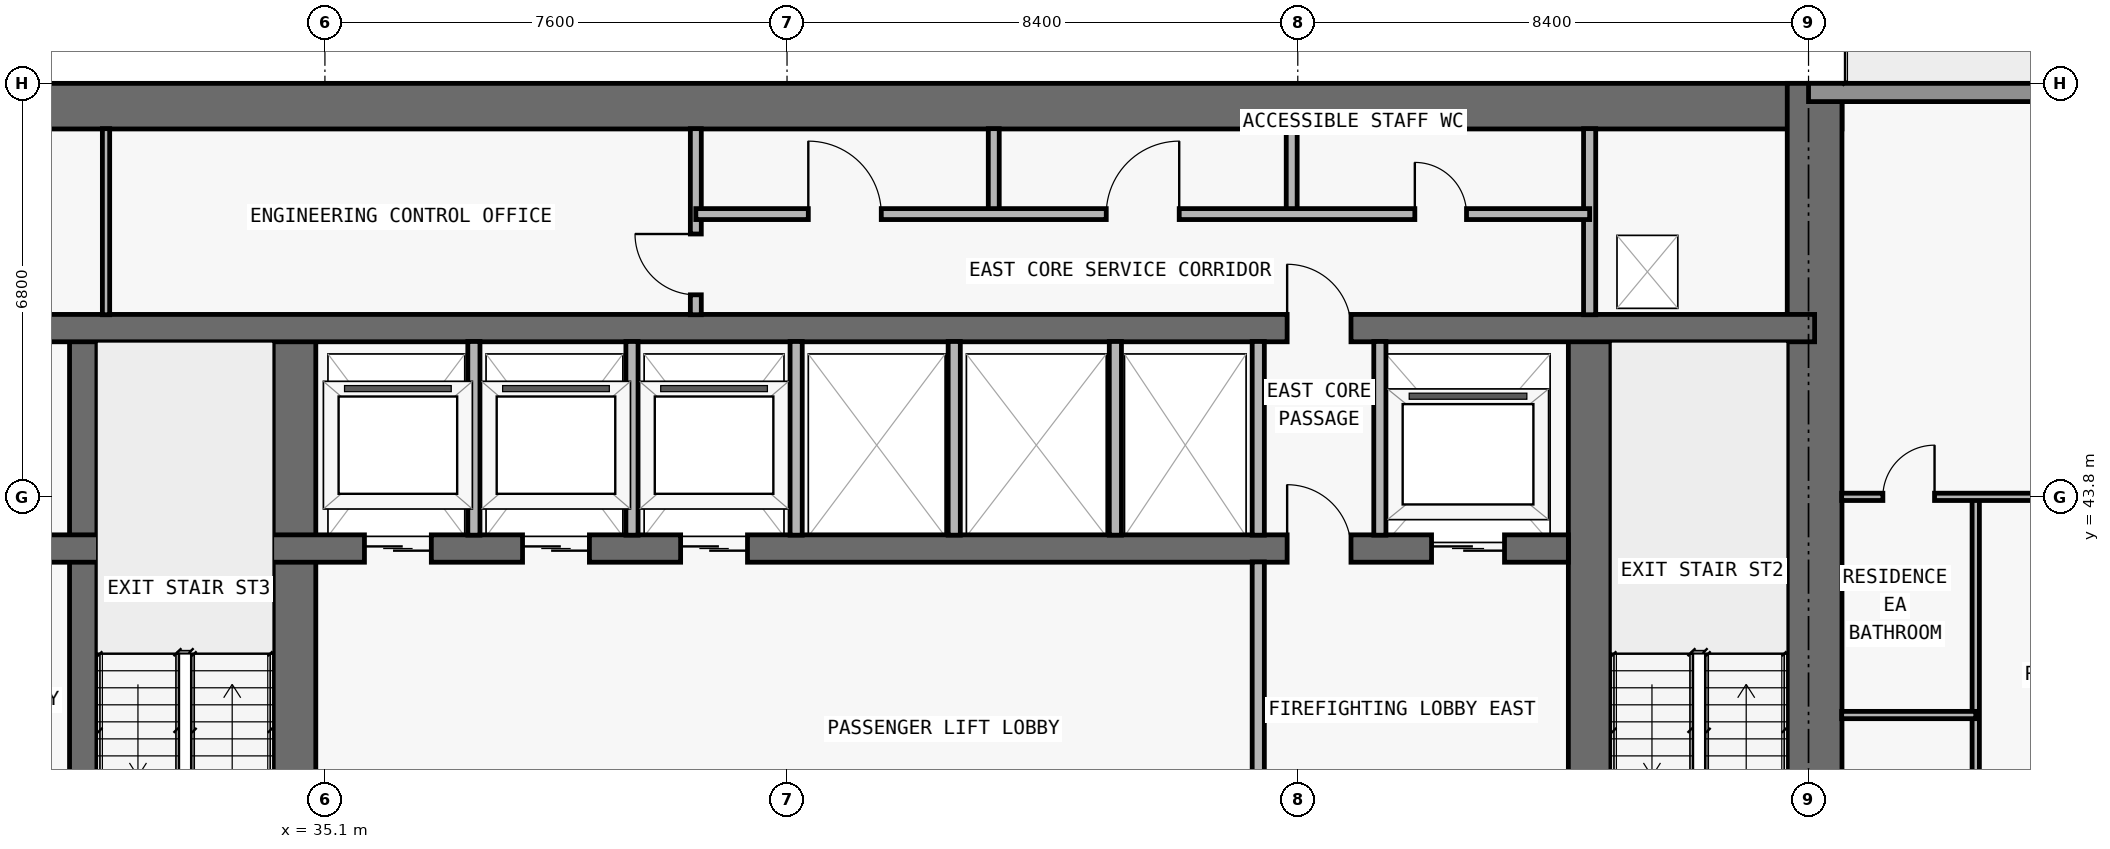
"""IFC4 building model, lengths in metres.
Left out: names, types, materials, properties, quantities, classifications, styles, units other than length and angle.
Written with IfcOpenShell. Run it as: python <this file> out.ifc"""

import sys

from ifc_helpers import new_model, si_unit, direction, frame, frame_2d, origin, place, context, subcontext, project, spatial, rectangle, extrude, element, fill, save


model = new_model("IFC4")
c1 = context("Model", 3, precision=1e-05, world=origin(), true_north=direction((0.0, 1.0)))
c2 = subcontext(c1, "Body", "Model", "MODEL_VIEW")
j1 = project(units=[si_unit("LENGTHUNIT", "METRE"), si_unit("PLANEANGLEUNIT", "RADIAN")], contexts=[c1])
p1 = place(None, origin())
s1 = spatial("IfcSite", under=j1, at=p1, CompositionType="ELEMENT")
p2 = place(p1, origin())
s2 = spatial("IfcBuilding", under=s1, at=p2, CompositionType="ELEMENT")
p3 = place(p2, frame((0.0, 0.0, 39.9)))
s3 = spatial("IfcBuildingStorey", under=s2, at=p3, CompositionType="ELEMENT", Elevation=39.9)
p4 = place(p3, frame((17.75, 50.225, 0.0), z_axis=(0.0, 0.0, 1.0), x_axis=(1.0, 0.0, 0.0)))
e1 = element("IfcWall", 1, at=p4, inside=s3, PredefinedType="SHEAR", context=c2, shape_type="SweptSolid", body=[
    extrude(rectangle(XDim=42.3, YDim=0.75, at=frame_2d((21.15, 0.0))), origin(), (0.0, 0.0, 1.0), 3.05),
])
p5 = place(p3, frame((59.6, 36.45, 0.0), z_axis=(0.0, 0.0, 1.0), x_axis=(0.0, 1.0, 0.0)))
e2 = element("IfcWall", 2, at=p5, inside=s3, PredefinedType="SHEAR", context=c2, shape_type="SweptSolid", body=[
    extrude(rectangle(XDim=14.15, YDim=0.9, at=frame_2d((7.075, 0.0))), origin(), (0.0, 0.0, 1.0), 3.05),
])
p6 = place(p3, frame((55.9, 36.9, 0.0), z_axis=(0.0, 0.0, 1.0), x_axis=(0.0, 1.0, 0.0)))
e3 = element("IfcWall", 3, at=p6, inside=s3, PredefinedType="SHEAR", context=c2, shape_type="SweptSolid", body=[
    extrude(rectangle(XDim=9.675, YDim=0.7, at=frame_2d((4.837, 0.0))), origin(), (0.0, 0.0, 1.0), 3.05),
])
p7 = place(p6, frame((0.65, 0.0, 0.0)))
e4 = element("IfcOpeningElement", 4, at=p7, cuts=e3, PredefinedType="OPENING", context=c2, shape_type="SweptSolid", body=[
    extrude(rectangle(XDim=1.1, YDim=2.15, at=frame_2d((0.55, 1.075))), frame((0.0, 0.36, 0.0), z_axis=(0.0, -1.0, 0.0), x_axis=(1.0, 0.0, 0.0)), (0.0, 0.0, 1.0), 0.72),
])
p8 = place(p3, frame((31.125, 36.9, 0.0), z_axis=(0.0, 0.0, 1.0), x_axis=(0.0, 1.0, 0.0)))
e5 = element("IfcWall", 5, at=p8, inside=s3, PredefinedType="SHEAR", context=c2, shape_type="SweptSolid", body=[
    extrude(rectangle(XDim=9.675, YDim=0.45, at=frame_2d((4.837, 0.0))), origin(), (0.0, 0.0, 1.0), 3.05),
])
p9 = place(p3, frame((34.6, 36.9, 0.0), z_axis=(0.0, 0.0, 1.0), x_axis=(0.0, 1.0, 0.0)))
e6 = element("IfcWall", 6, at=p9, inside=s3, PredefinedType="SHEAR", context=c2, shape_type="SweptSolid", body=[
    extrude(rectangle(XDim=9.675, YDim=0.7, at=frame_2d((4.837, 0.0))), origin(), (0.0, 0.0, 1.0), 3.05),
])
p10 = place(p3, frame((22.25, 42.95, 0.0), z_axis=(0.0, 0.0, 1.0), x_axis=(1.0, 0.0, 0.0)))
e7 = element("IfcWall", 7, at=p10, inside=s3, PredefinedType="SHEAR", context=c2, shape_type="SweptSolid", body=[
    extrude(rectangle(XDim=33.3, YDim=0.45, at=frame_2d((16.65, 0.0))), origin(), (0.0, 0.0, 1.0), 3.05),
])
p11 = place(p10, frame((1.05, 0.0, 0.0)))
e8 = element("IfcOpeningElement", 8, at=p11, cuts=e7, PredefinedType="OPENING", context=c2, shape_type="SweptSolid", body=[
    extrude(rectangle(XDim=1.2, YDim=2.2, at=frame_2d((0.6, 1.1))), frame((0.0, 0.235, 0.0), z_axis=(0.0, -1.0, 0.0), x_axis=(1.0, 0.0, 0.0)), (0.0, 0.0, 1.0), 0.47),
])
p12 = place(p10, frame((31.05, 0.0, 0.0)))
e9 = element("IfcOpeningElement", 9, at=p12, cuts=e7, PredefinedType="OPENING", context=c2, shape_type="SweptSolid", body=[
    extrude(rectangle(XDim=1.2, YDim=2.2, at=frame_2d((0.6, 1.1))), frame((0.0, 0.235, 0.0), z_axis=(0.0, -1.0, 0.0), x_axis=(1.0, 0.0, 0.0)), (0.0, 0.0, 1.0), 0.47),
])
p13 = place(p10, frame((13.5, 0.0, 0.0)))
e10 = element("IfcOpeningElement", 10, at=p13, cuts=e7, PredefinedType="OPENING", context=c2, shape_type="SweptSolid", body=[
    extrude(rectangle(XDim=1.1, YDim=2.2, at=frame_2d((0.55, 1.1))), frame((0.0, 0.235, 0.0), z_axis=(0.0, -1.0, 0.0), x_axis=(1.0, 0.0, 0.0)), (0.0, 0.0, 1.0), 0.47),
])
p14 = place(p10, frame((16.1, 0.0, 0.0)))
e11 = element("IfcOpeningElement", 11, at=p14, cuts=e7, PredefinedType="OPENING", context=c2, shape_type="SweptSolid", body=[
    extrude(rectangle(XDim=1.1, YDim=2.2, at=frame_2d((0.55, 1.1))), frame((0.0, 0.235, 0.0), z_axis=(0.0, -1.0, 0.0), x_axis=(1.0, 0.0, 0.0)), (0.0, 0.0, 1.0), 0.47),
])
p15 = place(p10, frame((18.7, 0.0, 0.0)))
e12 = element("IfcOpeningElement", 12, at=p15, cuts=e7, PredefinedType="OPENING", context=c2, shape_type="SweptSolid", body=[
    extrude(rectangle(XDim=1.1, YDim=2.2, at=frame_2d((0.55, 1.1))), frame((0.0, 0.235, 0.0), z_axis=(0.0, -1.0, 0.0), x_axis=(1.0, 0.0, 0.0)), (0.0, 0.0, 1.0), 0.47),
])
p16 = place(p10, frame((3.625, 0.0, 0.0)))
e13 = element("IfcOpeningElement", 13, at=p16, cuts=e7, PredefinedType="OPENING", context=c2, shape_type="SweptSolid", body=[
    extrude(rectangle(XDim=1.05, YDim=2.15, at=frame_2d((0.525, 1.075))), frame((0.0, 0.235, 0.0), z_axis=(0.0, -1.0, 0.0), x_axis=(1.0, 0.0, 0.0)), (0.0, 0.0, 1.0), 0.47),
])
p17 = place(p10, frame((28.675, 0.0, 0.0)))
e14 = element("IfcOpeningElement", 14, at=p17, cuts=e7, PredefinedType="OPENING", context=c2, shape_type="SweptSolid", body=[
    extrude(rectangle(XDim=1.05, YDim=2.15, at=frame_2d((0.525, 1.075))), frame((0.0, 0.235, 0.0), z_axis=(0.0, -1.0, 0.0), x_axis=(1.0, 0.0, 0.0)), (0.0, 0.0, 1.0), 0.47),
])
p18 = place(p3, frame((18.2, 46.575, 0.0), z_axis=(0.0, 0.0, 1.0), x_axis=(1.0, 0.0, 0.0)))
e15 = element("IfcWall", 15, at=p18, inside=s3, PredefinedType="SHEAR", context=c2, shape_type="SweptSolid", body=[
    extrude(rectangle(XDim=41.4, YDim=0.45, at=frame_2d((20.7, 0.0))), origin(), (0.0, 0.0, 1.0), 3.05),
])
p19 = place(p18, frame((7.7, 0.0, 0.0)))
e16 = element("IfcOpeningElement", 16, at=p19, cuts=e15, PredefinedType="OPENING", context=c2, shape_type="SweptSolid", body=[
    extrude(rectangle(XDim=1.0, YDim=2.2, at=frame_2d((0.5, 1.1))), frame((0.0, 0.235, 0.0), z_axis=(0.0, -1.0, 0.0), x_axis=(1.0, 0.0, 0.0)), (0.0, 0.0, 1.0), 0.47),
])
p20 = place(p18, frame((32.725, 0.0, 0.0)))
e17 = element("IfcOpeningElement", 17, at=p20, cuts=e15, PredefinedType="OPENING", context=c2, shape_type="SweptSolid", body=[
    extrude(rectangle(XDim=1.05, YDim=2.15, at=frame_2d((0.525, 1.075))), frame((0.0, 0.235, 0.0), z_axis=(0.0, -1.0, 0.0), x_axis=(1.0, 0.0, 0.0)), (0.0, 0.0, 1.0), 0.47),
])
p21 = place(p3, frame((59.5, 50.45, 0.0), z_axis=(0.0, 0.0, 1.0), x_axis=(1.0, 0.0, 0.0)))
e18 = element("IfcWall", 18, at=p21, inside=s3, PredefinedType="STANDARD", context=c2, shape_type="SweptSolid", body=[
    extrude(rectangle(XDim=13.2, YDim=0.3, at=frame_2d((6.6, 0.0))), origin(), (0.0, 0.0, 1.0), 3.05),
])
p22 = place(p21, frame((5.6, 0.0, 0.0)))
e19 = element("IfcOpeningElement", 19, at=p22, cuts=e18, PredefinedType="OPENING", context=c2, shape_type="SweptSolid", body=[
    extrude(rectangle(XDim=2.0, YDim=2.3, at=frame_2d((1.0, 1.15))), frame((0.0, 0.16, 0.0), z_axis=(0.0, -1.0, 0.0), x_axis=(1.0, 0.0, 0.0)), (0.0, 0.0, 1.0), 0.32),
])
p23 = place(p3, frame((31.5, 46.795, 0.0), z_axis=(0.0, 0.0, 1.0), x_axis=(0.0, 1.0, 0.0)))
e20 = element("IfcWall", 20, at=p23, inside=s3, PredefinedType="PARTITIONING", context=c2, shape_type="SweptSolid", body=[
    extrude(rectangle(XDim=3.06, YDim=0.12, at=frame_2d((1.53, 0.0))), origin(), (0.0, 0.0, 1.0), 3.05),
])
for number, where, z_axis, x_axis in (
    (21, (37.55, 43.17, 0.0), (0.0, 0.0, 1.0), (0.0, 1.0, 0.0)),
    (22, (40.15, 43.17, 0.0), (0.0, 0.0, 1.0), (0.0, 1.0, 0.0)),
):
    element("IfcWall", number, at=place(p3, frame(where, z_axis=z_axis, x_axis=x_axis)), inside=s3, PredefinedType="PARTITIONING", context=c2, shape_type="SweptSolid", body=[
        extrude(rectangle(XDim=3.185, YDim=0.2, at=frame_2d((1.593, 0.0))), origin(), (0.0, 0.0, 1.0), 3.05),
    ])
p24 = place(p3, frame((41.2, 46.795, 0.0), z_axis=(0.0, 0.0, 1.0), x_axis=(0.0, 1.0, 0.0)))
e23 = element("IfcWall", 23, at=p24, inside=s3, PredefinedType="PARTITIONING", context=c2, shape_type="SweptSolid", body=[
    extrude(rectangle(XDim=3.06, YDim=0.18, at=frame_2d((1.53, 0.0))), origin(), (0.0, 0.0, 1.0), 3.05),
])
p25 = place(p24, frame((0.327, 0.0, 0.0)))
e24 = element("IfcOpeningElement", 24, at=p25, cuts=e23, PredefinedType="OPENING", context=c2, shape_type="SweptSolid", body=[
    extrude(rectangle(XDim=1.0, YDim=2.2, at=frame_2d((0.5, 1.1))), frame((0.0, 0.1, 0.0), z_axis=(0.0, -1.0, 0.0), x_axis=(1.0, 0.0, 0.0)), (0.0, 0.0, 1.0), 0.2),
])
for number, where, z_axis, x_axis in (
    (25, (42.85, 43.17, 0.0), (0.0, 0.0, 1.0), (0.0, 1.0, 0.0)),
    (26, (45.45, 43.17, 0.0), (0.0, 0.0, 1.0), (0.0, 1.0, 0.0)),
):
    element("IfcWall", number, at=place(p3, frame(where, z_axis=z_axis, x_axis=x_axis)), inside=s3, PredefinedType="PARTITIONING", context=c2, shape_type="SweptSolid", body=[
        extrude(rectangle(XDim=3.185, YDim=0.2, at=frame_2d((1.593, 0.0))), origin(), (0.0, 0.0, 1.0), 3.05),
    ])
p26 = place(p3, frame((46.1, 48.45, 0.0), z_axis=(0.0, 0.0, 1.0), x_axis=(0.0, 1.0, 0.0)))
e27 = element("IfcWall", 27, at=p26, inside=s3, PredefinedType="PARTITIONING", context=c2, shape_type="SweptSolid", body=[
    extrude(rectangle(XDim=1.405, YDim=0.18, at=frame_2d((0.703, 0.0))), origin(), (0.0, 0.0, 1.0), 3.05),
])
p27 = place(p3, frame((48.1, 43.17, 0.0), z_axis=(0.0, 0.0, 1.0), x_axis=(0.0, 1.0, 0.0)))
e28 = element("IfcWall", 28, at=p27, inside=s3, PredefinedType="PARTITIONING", context=c2, shape_type="SweptSolid", body=[
    extrude(rectangle(XDim=3.185, YDim=0.2, at=frame_2d((1.593, 0.0))), origin(), (0.0, 0.0, 1.0), 3.05),
])
p28 = place(p3, frame((50.45, 37.345, 0.0), z_axis=(0.0, 0.0, 1.0), x_axis=(0.0, 1.0, 0.0)))
e29 = element("IfcWall", 29, at=p28, inside=s3, PredefinedType="PARTITIONING", context=c2, shape_type="SweptSolid", body=[
    extrude(rectangle(XDim=5.385, YDim=0.2, at=frame_2d((2.692, 0.0))), origin(), (0.0, 0.0, 1.0), 3.05),
])
p29 = place(p3, frame((50.45, 43.17, 0.0), z_axis=(0.0, 0.0, 1.0), x_axis=(0.0, 1.0, 0.0)))
e30 = element("IfcWall", 30, at=p29, inside=s3, PredefinedType="PARTITIONING", context=c2, shape_type="SweptSolid", body=[
    extrude(rectangle(XDim=3.185, YDim=0.2, at=frame_2d((1.593, 0.0))), origin(), (0.0, 0.0, 1.0), 3.05),
])
p30 = place(p3, frame((51.0, 48.45, 0.0), z_axis=(0.0, 0.0, 1.0), x_axis=(0.0, 1.0, 0.0)))
e31 = element("IfcWall", 31, at=p30, inside=s3, PredefinedType="PARTITIONING", context=c2, shape_type="SweptSolid", body=[
    extrude(rectangle(XDim=1.405, YDim=0.18, at=frame_2d((0.703, 0.0))), origin(), (0.0, 0.0, 1.0), 3.05),
])
p31 = place(p3, frame((52.45, 43.17, 0.0), z_axis=(0.0, 0.0, 1.0), x_axis=(0.0, 1.0, 0.0)))
e32 = element("IfcWall", 32, at=p31, inside=s3, PredefinedType="PARTITIONING", context=c2, shape_type="SweptSolid", body=[
    extrude(rectangle(XDim=3.185, YDim=0.2, at=frame_2d((1.593, 0.0))), origin(), (0.0, 0.0, 1.0), 3.05),
])
p32 = place(p3, frame((55.9, 46.795, 0.0), z_axis=(0.0, 0.0, 1.0), x_axis=(0.0, 1.0, 0.0)))
e33 = element("IfcWall", 33, at=p32, inside=s3, PredefinedType="PARTITIONING", context=c2, shape_type="SweptSolid", body=[
    extrude(rectangle(XDim=3.06, YDim=0.2, at=frame_2d((1.53, 0.0))), origin(), (0.0, 0.0, 1.0), 3.05),
])
p33 = place(p3, frame((62.25, 36.9, 0.0), z_axis=(0.0, 0.0, 1.0), x_axis=(0.0, 1.0, 0.0)))
e34 = element("IfcWall", 34, at=p33, inside=s3, PredefinedType="PARTITIONING", context=c2, shape_type="SweptSolid", body=[
    extrude(rectangle(XDim=6.9, YDim=0.12, at=frame_2d((3.45, 0.0))), origin(), (0.0, 0.0, 1.0), 3.05),
])
p34 = place(p33, frame((1.231, 0.0, 0.0)))
e35 = element("IfcOpeningElement", 35, at=p34, cuts=e34, PredefinedType="OPENING", context=c2, shape_type="SweptSolid", body=[
    extrude(rectangle(XDim=0.85, YDim=2.1, at=frame_2d((0.425, 1.05))), frame((0.0, 0.07, 0.0), z_axis=(0.0, -1.0, 0.0), x_axis=(1.0, 0.0, 0.0)), (0.0, 0.0, 1.0), 0.14),
])
p35 = place(p3, frame((60.045, 40.212, 0.0), z_axis=(0.0, 0.0, 1.0), x_axis=(1.0, 0.0, 0.0)))
e36 = element("IfcWall", 36, at=p35, inside=s3, PredefinedType="PARTITIONING", context=c2, shape_type="SweptSolid", body=[
    extrude(rectangle(XDim=2.205, YDim=0.12, at=frame_2d((1.103, 0.0))), origin(), (0.0, 0.0, 1.0), 3.05),
])
p36 = place(p3, frame((60.045, 43.8, 0.0), z_axis=(0.0, 0.0, 1.0), x_axis=(1.0, 0.0, 0.0)))
e37 = element("IfcWall", 37, at=p36, inside=s3, PredefinedType="PARTITIONING", context=c2, shape_type="SweptSolid", body=[
    extrude(rectangle(XDim=15.96, YDim=0.12, at=frame_2d((7.98, 0.0))), origin(), (0.0, 0.0, 1.0), 2.339),
])
p37 = place(p36, frame((9.805, 0.0, 0.0)))
e38 = element("IfcOpeningElement", 38, at=p37, cuts=e37, PredefinedType="OPENING", context=c2, shape_type="SweptSolid", body=[
    extrude(rectangle(XDim=0.9, YDim=2.15, at=frame_2d((0.45, 1.075))), frame((0.0, 0.07, 0.0), z_axis=(0.0, -1.0, 0.0), x_axis=(1.0, 0.0, 0.0)), (0.0, 0.0, 1.0), 0.14),
])
p38 = place(p36, frame((4.58, 0.0, 0.0)))
e39 = element("IfcOpeningElement", 39, at=p38, cuts=e37, PredefinedType="OPENING", context=c2, shape_type="SweptSolid", body=[
    extrude(rectangle(XDim=0.9, YDim=2.15, at=frame_2d((0.45, 1.075))), frame((0.0, 0.07, 0.0), z_axis=(0.0, -1.0, 0.0), x_axis=(1.0, 0.0, 0.0)), (0.0, 0.0, 1.0), 0.14),
])
p39 = place(p36, frame((0.677, 0.0, 0.0)))
e40 = element("IfcOpeningElement", 40, at=p39, cuts=e37, PredefinedType="OPENING", context=c2, shape_type="SweptSolid", body=[
    extrude(rectangle(XDim=0.85, YDim=2.1, at=frame_2d((0.425, 1.05))), frame((0.0, 0.07, 0.0), z_axis=(0.0, -1.0, 0.0), x_axis=(1.0, 0.0, 0.0)), (0.0, 0.0, 1.0), 0.14),
])
p40 = place(p3, frame((41.2, 48.45, 0.0), z_axis=(0.0, 0.0, 1.0), x_axis=(1.0, 0.0, 0.0)))
e41 = element("IfcWall", 41, at=p40, inside=s3, PredefinedType="PARTITIONING", context=c2, shape_type="SweptSolid", body=[
    extrude(rectangle(XDim=14.7, YDim=0.18, at=frame_2d((7.35, 0.0))), origin(), (0.0, 0.0, 1.0), 3.05),
])
p41 = place(p40, frame((1.85, 0.0, 0.0)))
e42 = element("IfcOpeningElement", 42, at=p41, cuts=e41, PredefinedType="OPENING", context=c2, shape_type="SweptSolid", body=[
    extrude(rectangle(XDim=1.2, YDim=2.2, at=frame_2d((0.6, 1.1))), frame((0.0, 0.1, 0.0), z_axis=(0.0, -1.0, 0.0), x_axis=(1.0, 0.0, 0.0)), (0.0, 0.0, 1.0), 0.2),
])
p42 = place(p40, frame((6.75, 0.0, 0.0)))
e43 = element("IfcOpeningElement", 43, at=p42, cuts=e41, PredefinedType="OPENING", context=c2, shape_type="SweptSolid", body=[
    extrude(rectangle(XDim=1.2, YDim=2.2, at=frame_2d((0.6, 1.1))), frame((0.0, 0.1, 0.0), z_axis=(0.0, -1.0, 0.0), x_axis=(1.0, 0.0, 0.0)), (0.0, 0.0, 1.0), 0.2),
])
p43 = place(p40, frame((11.825, 0.0, 0.0)))
e44 = element("IfcOpeningElement", 44, at=p43, cuts=e41, PredefinedType="OPENING", context=c2, shape_type="SweptSolid", body=[
    extrude(rectangle(XDim=0.85, YDim=2.1, at=frame_2d((0.425, 1.05))), frame((0.0, 0.1, 0.0), z_axis=(0.0, -1.0, 0.0), x_axis=(1.0, 0.0, 0.0)), (0.0, 0.0, 1.0), 0.2),
])
p44 = place(p12, origin())
e45 = element("IfcDoor", 45, at=p44, inside=s3, OperationType="DOUBLE_DOOR_SLIDING", PredefinedType="DOOR", context=c2, shape_type="SweptSolid", body=[
    extrude(rectangle(XDim=1.2, YDim=2.2, at=frame_2d((0.6, 1.1))), frame((0.0, 0.025, 0.0), z_axis=(0.0, -1.0, 0.0), x_axis=(1.0, 0.0, 0.0)), (0.0, 0.0, 1.0), 0.05),
])
fill(e9, e45)
p45 = place(p13, origin())
e46 = element("IfcDoor", 46, at=p45, inside=s3, OperationType="DOUBLE_DOOR_SLIDING", PredefinedType="DOOR", context=c2, shape_type="SweptSolid", body=[
    extrude(rectangle(XDim=1.1, YDim=2.2, at=frame_2d((0.55, 1.1))), frame((0.0, 0.025, 0.0), z_axis=(0.0, -1.0, 0.0), x_axis=(1.0, 0.0, 0.0)), (0.0, 0.0, 1.0), 0.05),
])
fill(e10, e46)
p46 = place(p14, origin())
e47 = element("IfcDoor", 47, at=p46, inside=s3, OperationType="DOUBLE_DOOR_SLIDING", PredefinedType="DOOR", context=c2, shape_type="SweptSolid", body=[
    extrude(rectangle(XDim=1.1, YDim=2.2, at=frame_2d((0.55, 1.1))), frame((0.0, 0.025, 0.0), z_axis=(0.0, -1.0, 0.0), x_axis=(1.0, 0.0, 0.0)), (0.0, 0.0, 1.0), 0.05),
])
fill(e11, e47)
p47 = place(p15, origin())
e48 = element("IfcDoor", 48, at=p47, inside=s3, OperationType="DOUBLE_DOOR_SLIDING", PredefinedType="DOOR", context=c2, shape_type="SweptSolid", body=[
    extrude(rectangle(XDim=1.1, YDim=2.2, at=frame_2d((0.55, 1.1))), frame((0.0, 0.025, 0.0), z_axis=(0.0, -1.0, 0.0), x_axis=(1.0, 0.0, 0.0)), (0.0, 0.0, 1.0), 0.05),
])
fill(e12, e48)
p48 = place(p17, origin())
e49 = element("IfcDoor", 49, at=p48, inside=s3, OperationType="SINGLE_SWING_LEFT", PredefinedType="DOOR", context=c2, shape_type="SweptSolid", body=[
    extrude(rectangle(XDim=1.05, YDim=2.15, at=frame_2d((0.525, 1.075))), frame((0.0, 0.025, 0.0), z_axis=(0.0, -1.0, 0.0), x_axis=(1.0, 0.0, 0.0)), (0.0, 0.0, 1.0), 0.05),
])
fill(e14, e49)
p49 = place(p20, origin())
e50 = element("IfcDoor", 50, at=p49, inside=s3, OperationType="SINGLE_SWING_LEFT", PredefinedType="DOOR", context=c2, shape_type="SweptSolid", body=[
    extrude(rectangle(XDim=1.05, YDim=2.15, at=frame_2d((0.525, 1.075))), frame((0.0, 0.025, 0.0), z_axis=(0.0, -1.0, 0.0), x_axis=(1.0, 0.0, 0.0)), (0.0, 0.0, 1.0), 0.05),
])
fill(e17, e50)
p50 = place(p25, origin())
e51 = element("IfcDoor", 51, at=p50, inside=s3, OperationType="SINGLE_SWING_RIGHT", PredefinedType="DOOR", context=c2, shape_type="SweptSolid", body=[
    extrude(rectangle(XDim=1.0, YDim=2.2, at=frame_2d((0.5, 1.1))), frame((0.0, 0.025, 0.0), z_axis=(0.0, -1.0, 0.0), x_axis=(1.0, 0.0, 0.0)), (0.0, 0.0, 1.0), 0.05),
])
fill(e24, e51)
p51 = place(p41, origin())
e52 = element("IfcDoor", 52, at=p51, inside=s3, OperationType="SINGLE_SWING_LEFT", PredefinedType="DOOR", context=c2, shape_type="SweptSolid", body=[
    extrude(rectangle(XDim=1.2, YDim=2.2, at=frame_2d((0.6, 1.1))), frame((0.0, 0.025, 0.0), z_axis=(0.0, -1.0, 0.0), x_axis=(1.0, 0.0, 0.0)), (0.0, 0.0, 1.0), 0.05),
])
fill(e42, e52)
p52 = place(p42, origin())
e53 = element("IfcDoor", 53, at=p52, inside=s3, OperationType="SINGLE_SWING_RIGHT", PredefinedType="DOOR", context=c2, shape_type="SweptSolid", body=[
    extrude(rectangle(XDim=1.2, YDim=2.2, at=frame_2d((0.6, 1.1))), frame((0.0, 0.025, 0.0), z_axis=(0.0, -1.0, 0.0), x_axis=(1.0, 0.0, 0.0)), (0.0, 0.0, 1.0), 0.05),
])
fill(e43, e53)
p53 = place(p43, origin())
e54 = element("IfcDoor", 54, at=p53, inside=s3, OperationType="SINGLE_SWING_LEFT", PredefinedType="DOOR", context=c2, shape_type="SweptSolid", body=[
    extrude(rectangle(XDim=0.85, YDim=2.1, at=frame_2d((0.425, 1.05))), frame((0.0, 0.025, 0.0), z_axis=(0.0, -1.0, 0.0), x_axis=(1.0, 0.0, 0.0)), (0.0, 0.0, 1.0), 0.05),
])
fill(e44, e54)
p54 = place(p39, origin())
e55 = element("IfcDoor", 55, at=p54, inside=s3, OperationType="SINGLE_SWING_RIGHT", PredefinedType="DOOR", context=c2, shape_type="SweptSolid", body=[
    extrude(rectangle(XDim=0.85, YDim=2.1, at=frame_2d((0.425, 1.05))), frame((0.0, 0.025, 0.0), z_axis=(0.0, -1.0, 0.0), x_axis=(1.0, 0.0, 0.0)), (0.0, 0.0, 1.0), 0.05),
])
fill(e40, e55)
save(model, sys.argv[1])
